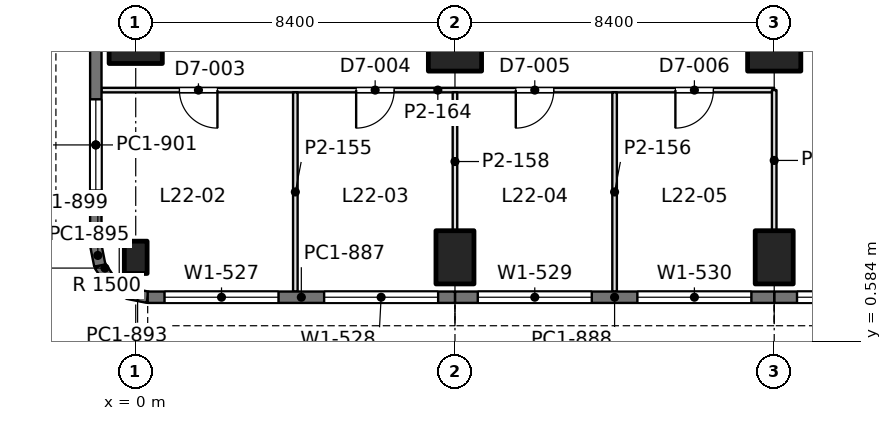
"""IFC4 building model, lengths in metres.
Left out: names, types, materials, properties, quantities, classifications, styles, units other than length and angle.
Written with IfcOpenShell. Run it as: python <this file> out.ifc"""

import sys

from ifc_helpers import new_model, si_unit, direction, frame, frame_2d, origin, origin_2d, place, context, subcontext, project, spatial, rectangle, extrude, element, fill, save


model = new_model("IFC4")
c1 = context("Model", 3, precision=1e-05, world=origin(), true_north=direction((0.0, 1.0)))
c2 = subcontext(c1, "Body", "Model", "MODEL_VIEW")
j1 = project(units=[si_unit("LENGTHUNIT", "METRE"), si_unit("PLANEANGLEUNIT", "RADIAN")], contexts=[c1])
p1 = place(None, origin())
s1 = spatial("IfcSite", under=j1, at=p1, CompositionType="ELEMENT")
p2 = place(p1, origin())
s2 = spatial("IfcBuilding", under=s1, at=p2, CompositionType="ELEMENT")
p3 = place(p2, frame((0.0, 0.0, 100.8)))
s3 = spatial("IfcBuildingStorey", under=s2, at=p3, CompositionType="ELEMENT", Elevation=100.8)
p4 = place(p3, frame((0.0, 2.8, 0.0), z_axis=(0.0, 0.0, 1.0), x_axis=(1.0, 0.0, 0.0)))
e1 = element("IfcColumn", 1, at=p4, inside=s3, PredefinedType="COLUMN", context=c2, shape_type="SweptSolid", body=[
    extrude(rectangle(XDim=0.6, YDim=0.85, at=origin_2d()), origin(), (0.0, 0.0, 1.0), 4.2),
])
for number, where, z_axis, x_axis in (
    (2, (0.0, 8.4, 0.0), (0.0, 0.0, 1.0), (0.0, 1.0, 0.0)),
    (3, (8.4, 2.8, 0.0), (0.0, 0.0, 1.0), (1.0, 0.0, 0.0)),
):
    element("IfcColumn", number, at=place(p3, frame(where, z_axis=z_axis, x_axis=x_axis)), inside=s3, PredefinedType="COLUMN", context=c2, shape_type="SweptSolid", body=[
        extrude(rectangle(XDim=1.0, YDim=1.4, at=origin_2d()), origin(), (0.0, 0.0, 1.0), 4.2),
    ])
p5 = place(p3, frame((8.4, 8.4, 0.0), z_axis=(0.0, 0.0, 1.0), x_axis=(1.0, 0.0, 0.0)))
e4 = element("IfcColumn", 4, at=p5, inside=s3, PredefinedType="COLUMN", context=c2, shape_type="SweptSolid", body=[
    extrude(rectangle(XDim=1.4, YDim=1.4, at=origin_2d()), origin(), (0.0, 0.0, 1.0), 4.2),
])
p6 = place(p3, frame((16.8, 2.8, 0.0), z_axis=(0.0, 0.0, 1.0), x_axis=(1.0, 0.0, 0.0)))
e5 = element("IfcColumn", 5, at=p6, inside=s3, PredefinedType="COLUMN", context=c2, shape_type="SweptSolid", body=[
    extrude(rectangle(XDim=1.0, YDim=1.4, at=origin_2d()), origin(), (0.0, 0.0, 1.0), 4.2),
])
p7 = place(p3, frame((16.8, 8.4, 0.0), z_axis=(0.0, 0.0, 1.0), x_axis=(1.0, 0.0, 0.0)))
e6 = element("IfcColumn", 6, at=p7, inside=s3, PredefinedType="COLUMN", context=c2, shape_type="SweptSolid", body=[
    extrude(rectangle(XDim=1.4, YDim=1.4, at=origin_2d()), origin(), (0.0, 0.0, 1.0), 4.2),
])
p8 = place(p3, frame((25.2, 1.75, 0.0), z_axis=(0.0, 0.0, 1.0), x_axis=(-1.0, 0.0, 0.0)))
e7 = element("IfcWall", 7, at=p8, inside=s3, PredefinedType="SOLIDWALL", context=c2, shape_type="SweptSolid", body=[
    extrude(rectangle(XDim=8.4, YDim=0.3, at=frame_2d((4.2, 0.0))), origin(), (0.0, 0.0, 1.0), 4.05),
])
p9 = place(p8, frame((0.6, 0.0, 0.9)))
e8 = element("IfcOpeningElement", 8, at=p9, cuts=e7, PredefinedType="OPENING", context=c2, shape_type="SweptSolid", body=[
    extrude(rectangle(XDim=3.0, YDim=1.9, at=frame_2d((1.5, 0.95))), frame((0.0, 0.16, 0.0), z_axis=(0.0, -1.0, 0.0), x_axis=(1.0, 0.0, 0.0)), (0.0, 0.0, 1.0), 0.32),
])
p10 = place(p8, frame((4.8, 0.0, 0.9)))
e9 = element("IfcOpeningElement", 9, at=p10, cuts=e7, PredefinedType="OPENING", context=c2, shape_type="SweptSolid", body=[
    extrude(rectangle(XDim=3.0, YDim=1.9, at=frame_2d((1.5, 0.95))), frame((0.0, 0.16, 0.0), z_axis=(0.0, -1.0, 0.0), x_axis=(1.0, 0.0, 0.0)), (0.0, 0.0, 1.0), 0.32),
])
p11 = place(p3, frame((16.8, 1.75, 0.0), z_axis=(0.0, 0.0, 1.0), x_axis=(-1.0, 0.0, 0.0)))
e10 = element("IfcWall", 10, at=p11, inside=s3, PredefinedType="SOLIDWALL", context=c2, shape_type="SweptSolid", body=[
    extrude(rectangle(XDim=8.4, YDim=0.3, at=frame_2d((4.2, 0.0))), origin(), (0.0, 0.0, 1.0), 4.05),
])
p12 = place(p11, frame((0.6, 0.0, 0.9)))
e11 = element("IfcOpeningElement", 11, at=p12, cuts=e10, PredefinedType="OPENING", context=c2, shape_type="SweptSolid", body=[
    extrude(rectangle(XDim=3.0, YDim=1.9, at=frame_2d((1.5, 0.95))), frame((0.0, 0.16, 0.0), z_axis=(0.0, -1.0, 0.0), x_axis=(1.0, 0.0, 0.0)), (0.0, 0.0, 1.0), 0.32),
])
p13 = place(p11, frame((4.8, 0.0, 0.9)))
e12 = element("IfcOpeningElement", 12, at=p13, cuts=e10, PredefinedType="OPENING", context=c2, shape_type="SweptSolid", body=[
    extrude(rectangle(XDim=3.0, YDim=1.9, at=frame_2d((1.5, 0.95))), frame((0.0, 0.16, 0.0), z_axis=(0.0, -1.0, 0.0), x_axis=(1.0, 0.0, 0.0)), (0.0, 0.0, 1.0), 0.32),
])
p14 = place(p3, frame((8.4, 1.75, 0.0), z_axis=(0.0, 0.0, 1.0), x_axis=(-1.0, 0.0, 0.0)))
e13 = element("IfcWall", 13, at=p14, inside=s3, PredefinedType="SOLIDWALL", context=c2, shape_type="SweptSolid", body=[
    extrude(rectangle(XDim=8.085, YDim=0.3, at=frame_2d((4.042, 0.0))), origin(), (0.0, 0.0, 1.0), 4.05),
])
p15 = place(p14, frame((0.443, 0.0, 0.9)))
e14 = element("IfcOpeningElement", 14, at=p15, cuts=e13, PredefinedType="OPENING", context=c2, shape_type="SweptSolid", body=[
    extrude(rectangle(XDim=3.0, YDim=1.9, at=frame_2d((1.5, 0.95))), frame((0.0, 0.16, 0.0), z_axis=(0.0, -1.0, 0.0), x_axis=(1.0, 0.0, 0.0)), (0.0, 0.0, 1.0), 0.32),
])
p16 = place(p14, frame((4.643, 0.0, 0.9)))
e15 = element("IfcOpeningElement", 15, at=p16, cuts=e13, PredefinedType="OPENING", context=c2, shape_type="SweptSolid", body=[
    extrude(rectangle(XDim=3.0, YDim=1.9, at=frame_2d((1.5, 0.95))), frame((0.0, 0.16, 0.0), z_axis=(0.0, -1.0, 0.0), x_axis=(1.0, 0.0, 0.0)), (0.0, 0.0, 1.0), 0.32),
])
p17 = place(p3, frame((0.315, 1.75, 0.0), z_axis=(0.0, 0.0, 1.0), x_axis=(-0.980788534345, 0.195073962632, 0.0)))
e16 = element("IfcWall", 16, at=p17, inside=s3, PredefinedType="SOLIDWALL", context=c2, shape_type="SweptSolid", body=[
    extrude(rectangle(XDim=0.541, YDim=0.3, at=frame_2d((0.271, 0.0))), origin(), (0.0, 0.0, 1.0), 4.05),
])
for number, where, z_axis, x_axis in (
    (17, (-0.216, 1.855, 0.0), (0.0, 0.0, 1.0), (-0.831, 0.556, 0.0)),
    (18, (-0.653, 2.147, 0.0), (0.0, 0.0, 1.0), (-0.556, 0.831, 0.0)),
):
    element("IfcWall", number, at=place(p3, frame(where, z_axis=z_axis, x_axis=x_axis)), inside=s3, PredefinedType="SOLIDWALL", context=c2, shape_type="SweptSolid", body=[
        extrude(rectangle(XDim=0.526, YDim=0.3, at=frame_2d((0.263, 0.0))), origin(), (0.0, 0.0, 1.0), 4.05),
    ])
p18 = place(p3, frame((-0.945, 2.584, 0.0), z_axis=(0.0, 0.0, 1.0), x_axis=(-0.195073962632, 0.980788534345, 0.0)))
e19 = element("IfcWall", 19, at=p18, inside=s3, PredefinedType="SOLIDWALL", context=c2, shape_type="SweptSolid", body=[
    extrude(rectangle(XDim=0.541, YDim=0.3, at=frame_2d((0.271, 0.0))), origin(), (0.0, 0.0, 1.0), 4.05),
])
p19 = place(p3, frame((-1.05, 3.115, 0.0), z_axis=(0.0, 0.0, 1.0), x_axis=(0.0, 1.0, 0.0)))
e20 = element("IfcWall", 20, at=p19, inside=s3, PredefinedType="SOLIDWALL", context=c2, shape_type="SweptSolid", body=[
    extrude(rectangle(XDim=5.285, YDim=0.3, at=frame_2d((2.643, 0.0))), origin(), (0.0, 0.0, 1.0), 4.05),
])
p20 = place(p19, frame((1.443, 0.0, 0.9)))
e21 = element("IfcOpeningElement", 21, at=p20, cuts=e20, PredefinedType="OPENING", context=c2, shape_type="SweptSolid", body=[
    extrude(rectangle(XDim=2.4, YDim=1.9, at=frame_2d((1.2, 0.95))), frame((0.0, 0.16, 0.0), z_axis=(0.0, -1.0, 0.0), x_axis=(1.0, 0.0, 0.0)), (0.0, 0.0, 1.0), 0.32),
])
p21 = place(p3, frame((-0.902, 7.2, 0.0), z_axis=(0.0, 0.0, 1.0), x_axis=(1.0, 0.0, 0.0)))
e22 = element("IfcWall", 22, at=p21, inside=s3, PredefinedType="PARTITIONING", context=c2, shape_type="SweptSolid", body=[
    extrude(rectangle(XDim=17.702, YDim=0.12, at=frame_2d((8.851, 0.0))), origin(), (0.0, 0.0, 1.0), 3.55),
])
p22 = place(p21, frame((2.052, 0.0, 0.0)))
e23 = element("IfcOpeningElement", 23, at=p22, cuts=e22, PredefinedType="OPENING", context=c2, shape_type="SweptSolid", body=[
    extrude(rectangle(XDim=1.0, YDim=2.4, at=frame_2d((0.5, 1.2))), frame((0.0, 0.07, 0.0), z_axis=(0.0, -1.0, 0.0), x_axis=(1.0, 0.0, 0.0)), (0.0, 0.0, 1.0), 0.14),
])
p23 = place(p21, frame((6.702, 0.0, 0.0)))
e24 = element("IfcOpeningElement", 24, at=p23, cuts=e22, PredefinedType="OPENING", context=c2, shape_type="SweptSolid", body=[
    extrude(rectangle(XDim=1.0, YDim=2.4, at=frame_2d((0.5, 1.2))), frame((0.0, 0.07, 0.0), z_axis=(0.0, -1.0, 0.0), x_axis=(1.0, 0.0, 0.0)), (0.0, 0.0, 1.0), 0.14),
])
p24 = place(p21, frame((10.902, 0.0, 0.0)))
e25 = element("IfcOpeningElement", 25, at=p24, cuts=e22, PredefinedType="OPENING", context=c2, shape_type="SweptSolid", body=[
    extrude(rectangle(XDim=1.0, YDim=2.4, at=frame_2d((0.5, 1.2))), frame((0.0, 0.07, 0.0), z_axis=(0.0, -1.0, 0.0), x_axis=(1.0, 0.0, 0.0)), (0.0, 0.0, 1.0), 0.14),
])
p25 = place(p21, frame((15.102, 0.0, 0.0)))
e26 = element("IfcOpeningElement", 26, at=p25, cuts=e22, PredefinedType="OPENING", context=c2, shape_type="SweptSolid", body=[
    extrude(rectangle(XDim=1.0, YDim=2.4, at=frame_2d((0.5, 1.2))), frame((0.0, 0.07, 0.0), z_axis=(0.0, -1.0, 0.0), x_axis=(1.0, 0.0, 0.0)), (0.0, 0.0, 1.0), 0.14),
])
p26 = place(p3, frame((4.2, 1.898, 0.0), z_axis=(0.0, 0.0, 1.0), x_axis=(0.0, 1.0, 0.0)))
e27 = element("IfcWall", 27, at=p26, inside=s3, PredefinedType="PARTITIONING", context=c2, shape_type="SweptSolid", body=[
    extrude(rectangle(XDim=5.244, YDim=0.12, at=frame_2d((2.622, 0.0))), origin(), (0.0, 0.0, 1.0), 3.56),
])
p27 = place(p3, frame((8.4, 3.499, 0.0), z_axis=(0.0, 0.0, 1.0), x_axis=(0.0, 1.0, 0.0)))
e28 = element("IfcWall", 28, at=p27, inside=s3, PredefinedType="PARTITIONING", context=c2, shape_type="SweptSolid", body=[
    extrude(rectangle(XDim=3.643, YDim=0.12, at=frame_2d((1.822, 0.0))), origin(), (0.0, 0.0, 1.0), 3.55),
])
p28 = place(p3, frame((12.6, 1.898, 0.0), z_axis=(0.0, 0.0, 1.0), x_axis=(0.0, 1.0, 0.0)))
e29 = element("IfcWall", 29, at=p28, inside=s3, PredefinedType="PARTITIONING", context=c2, shape_type="SweptSolid", body=[
    extrude(rectangle(XDim=5.244, YDim=0.12, at=frame_2d((2.622, 0.0))), origin(), (0.0, 0.0, 1.0), 3.56),
])
p29 = place(p3, frame((16.8, 3.499, 0.0), z_axis=(0.0, 0.0, 1.0), x_axis=(0.0, 1.0, 0.0)))
e30 = element("IfcWall", 30, at=p29, inside=s3, PredefinedType="PARTITIONING", context=c2, shape_type="SweptSolid", body=[
    extrude(rectangle(XDim=3.701, YDim=0.12, at=frame_2d((1.851, 0.0))), origin(), (0.0, 0.0, 1.0), 3.55),
])
p30 = place(p10, origin())
e31 = element("IfcWindow", 31, at=p30, inside=s3, PartitioningType="SINGLE_PANEL", PredefinedType="WINDOW", context=c2, shape_type="SweptSolid", body=[
    extrude(rectangle(XDim=3.0, YDim=1.9, at=frame_2d((1.5, 0.95))), frame((0.0, 0.03, 0.0), z_axis=(0.0, -1.0, 0.0), x_axis=(1.0, 0.0, 0.0)), (0.0, 0.0, 1.0), 0.06),
])
fill(e9, e31)
p31 = place(p12, origin())
e32 = element("IfcWindow", 32, at=p31, inside=s3, PartitioningType="SINGLE_PANEL", PredefinedType="WINDOW", context=c2, shape_type="SweptSolid", body=[
    extrude(rectangle(XDim=3.0, YDim=1.9, at=frame_2d((1.5, 0.95))), frame((0.0, 0.03, 0.0), z_axis=(0.0, -1.0, 0.0), x_axis=(1.0, 0.0, 0.0)), (0.0, 0.0, 1.0), 0.06),
])
fill(e11, e32)
p32 = place(p13, origin())
e33 = element("IfcWindow", 33, at=p32, inside=s3, PartitioningType="SINGLE_PANEL", PredefinedType="WINDOW", context=c2, shape_type="SweptSolid", body=[
    extrude(rectangle(XDim=3.0, YDim=1.9, at=frame_2d((1.5, 0.95))), frame((0.0, 0.03, 0.0), z_axis=(0.0, -1.0, 0.0), x_axis=(1.0, 0.0, 0.0)), (0.0, 0.0, 1.0), 0.06),
])
fill(e12, e33)
p33 = place(p15, origin())
e34 = element("IfcWindow", 34, at=p33, inside=s3, PartitioningType="SINGLE_PANEL", PredefinedType="WINDOW", context=c2, shape_type="SweptSolid", body=[
    extrude(rectangle(XDim=3.0, YDim=1.9, at=frame_2d((1.5, 0.95))), frame((0.0, 0.03, 0.0), z_axis=(0.0, -1.0, 0.0), x_axis=(1.0, 0.0, 0.0)), (0.0, 0.0, 1.0), 0.06),
])
fill(e14, e34)
p34 = place(p16, origin())
e35 = element("IfcWindow", 35, at=p34, inside=s3, PartitioningType="SINGLE_PANEL", PredefinedType="WINDOW", context=c2, shape_type="SweptSolid", body=[
    extrude(rectangle(XDim=3.0, YDim=1.9, at=frame_2d((1.5, 0.95))), frame((0.0, 0.03, 0.0), z_axis=(0.0, -1.0, 0.0), x_axis=(1.0, 0.0, 0.0)), (0.0, 0.0, 1.0), 0.06),
])
fill(e15, e35)
p35 = place(p20, origin())
e36 = element("IfcWindow", 36, at=p35, inside=s3, PartitioningType="SINGLE_PANEL", PredefinedType="WINDOW", context=c2, shape_type="SweptSolid", body=[
    extrude(rectangle(XDim=2.4, YDim=1.9, at=frame_2d((1.2, 0.95))), frame((0.0, 0.03, 0.0), z_axis=(0.0, -1.0, 0.0), x_axis=(1.0, 0.0, 0.0)), (0.0, 0.0, 1.0), 0.06),
])
fill(e21, e36)
p36 = place(p22, frame((1.0, 0.0, 0.0), z_axis=(0.0, 0.0, 1.0), x_axis=(-1.0, 0.0, 0.0)))
e37 = element("IfcDoor", 37, at=p36, inside=s3, OperationType="SINGLE_SWING_LEFT", PredefinedType="DOOR", context=c2, shape_type="SweptSolid", body=[
    extrude(rectangle(XDim=1.0, YDim=2.4, at=frame_2d((0.5, 1.2))), frame((0.0, 0.025, 0.0), z_axis=(0.0, -1.0, 0.0), x_axis=(1.0, 0.0, 0.0)), (0.0, 0.0, 1.0), 0.05),
])
fill(e23, e37)
p37 = place(p23, frame((1.0, 0.0, 0.0), z_axis=(0.0, 0.0, 1.0), x_axis=(-1.0, 0.0, 0.0)))
e38 = element("IfcDoor", 38, at=p37, inside=s3, OperationType="SINGLE_SWING_RIGHT", PredefinedType="DOOR", context=c2, shape_type="SweptSolid", body=[
    extrude(rectangle(XDim=1.0, YDim=2.4, at=frame_2d((0.5, 1.2))), frame((0.0, 0.025, 0.0), z_axis=(0.0, -1.0, 0.0), x_axis=(1.0, 0.0, 0.0)), (0.0, 0.0, 1.0), 0.05),
])
fill(e24, e38)
p38 = place(p24, frame((1.0, 0.0, 0.0), z_axis=(0.0, 0.0, 1.0), x_axis=(-1.0, 0.0, 0.0)))
e39 = element("IfcDoor", 39, at=p38, inside=s3, OperationType="SINGLE_SWING_RIGHT", PredefinedType="DOOR", context=c2, shape_type="SweptSolid", body=[
    extrude(rectangle(XDim=1.0, YDim=2.4, at=frame_2d((0.5, 1.2))), frame((0.0, 0.025, 0.0), z_axis=(0.0, -1.0, 0.0), x_axis=(1.0, 0.0, 0.0)), (0.0, 0.0, 1.0), 0.05),
])
fill(e25, e39)
p39 = place(p25, frame((1.0, 0.0, 0.0), z_axis=(0.0, 0.0, 1.0), x_axis=(-1.0, 0.0, 0.0)))
e40 = element("IfcDoor", 40, at=p39, inside=s3, OperationType="SINGLE_SWING_RIGHT", PredefinedType="DOOR", context=c2, shape_type="SweptSolid", body=[
    extrude(rectangle(XDim=1.0, YDim=2.4, at=frame_2d((0.5, 1.2))), frame((0.0, 0.025, 0.0), z_axis=(0.0, -1.0, 0.0), x_axis=(1.0, 0.0, 0.0)), (0.0, 0.0, 1.0), 0.05),
])
fill(e26, e40)
save(model, sys.argv[1])
